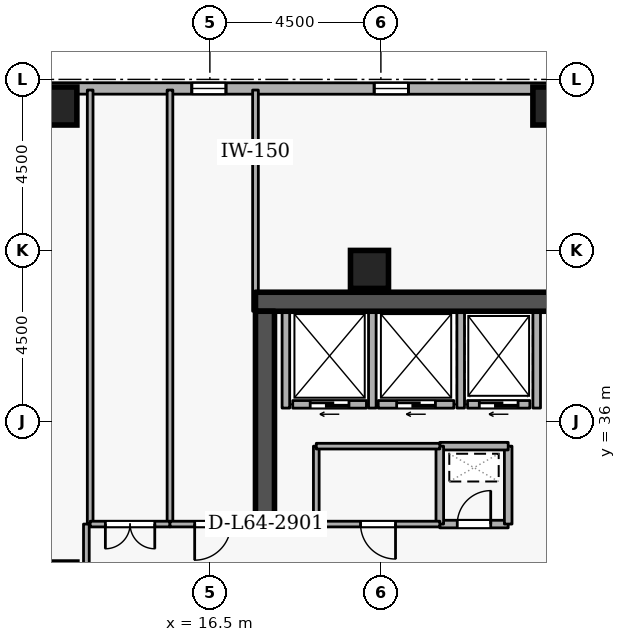
"""IFC4 building model, lengths in metres.
Left out: names, types, materials, properties, quantities, classifications, styles, units other than length and angle.
Written with IfcOpenShell. Run it as: python <this file> out.ifc"""

import sys

from ifc_helpers import new_model, si_unit, direction, frame, frame_2d, origin, origin_2d, place, context, subcontext, project, spatial, rectangle, extrude, element, fill, save


model = new_model("IFC4")
c1 = context("Model", 3, precision=1e-05, world=origin(), true_north=direction((0.0, 1.0)))
c2 = subcontext(c1, "Body", "Model", "MODEL_VIEW")
j1 = project(units=[si_unit("LENGTHUNIT", "METRE"), si_unit("PLANEANGLEUNIT", "RADIAN")], contexts=[c1])
p1 = place(None, origin())
s1 = spatial("IfcSite", under=j1, at=p1, CompositionType="ELEMENT")
p2 = place(p1, origin())
s2 = spatial("IfcBuilding", under=s1, at=p2, CompositionType="ELEMENT")
p3 = place(p2, frame((0.0, 0.0, 240.3)))
s3 = spatial("IfcBuildingStorey", under=s2, at=p3, CompositionType="ELEMENT", Elevation=240.3)
p4 = place(p3, frame((17.7, 39.15, 0.0), z_axis=(0.0, 0.0, 1.0), x_axis=(1.0, 0.0, 0.0)))
e1 = element("IfcWall", 1, at=p4, inside=s3, PredefinedType="SHEAR", context=c2, shape_type="SweptSolid", body=[
    extrude(rectangle(XDim=15.6, YDim=0.5, at=frame_2d((7.8, 0.0))), origin(), (0.0, 0.0, 1.0), 3.6),
])
p5 = place(p3, frame((17.95, 33.1, 0.0), z_axis=(0.0, 0.0, 1.0), x_axis=(0.0, 1.0, 0.0)))
e2 = element("IfcWall", 2, at=p5, inside=s3, PredefinedType="SHEAR", context=c2, shape_type="SweptSolid", body=[
    extrude(rectangle(XDim=5.8, YDim=0.5, at=frame_2d((2.9, 0.0))), origin(), (0.0, 0.0, 1.0), 3.6),
])
for number, where, z_axis, x_axis in (
    (3, (12.5, 44.3, 0.0), (0.0, 0.0, 1.0), (1.0, 0.0, 0.0)),
    (4, (25.5, 44.3, 0.0), (0.0, 0.0, 1.0), (1.0, 0.0, 0.0)),
    (5, (20.7, 40.0, 0.0), (0.0, 0.0, 1.0), (1.0, 0.0, 0.0)),
):
    element("IfcColumn", number, at=place(p3, frame(where, z_axis=z_axis, x_axis=x_axis)), inside=s3, PredefinedType="COLUMN", context=c2, shape_type="SweptSolid", body=[
        extrude(rectangle(XDim=1.0, YDim=1.0, at=origin_2d()), origin(), (0.0, 0.0, 1.0), 3.6),
    ])
p6 = place(p3, frame((37.924, 44.756, 0.0), z_axis=(0.0, 0.0, 1.0), x_axis=(-0.999999963872, 0.000268805477, 0.0)))
e6 = element("IfcWall", 6, at=p6, inside=s3, PredefinedType="STANDARD", context=c2, shape_type="SweptSolid", body=[
    extrude(rectangle(XDim=33.605, YDim=0.3, at=frame_2d((16.802, 0.0))), origin(), (0.0, 0.0, 1.0), 2.7),
])
p7 = place(p6, frame((6.6, 0.0, 0.72)))
e7 = element("IfcOpeningElement", 7, at=p7, cuts=e6, PredefinedType="OPENING", context=c2, shape_type="SweptSolid", body=[
    extrude(rectangle(XDim=0.9, YDim=1.75, at=frame_2d((0.45, 0.875))), frame((0.0, 0.16, 0.0), z_axis=(0.0, -1.0, 0.0), x_axis=(1.0, 0.0, 0.0)), (0.0, 0.0, 1.0), 0.32),
])
p8 = place(p6, frame((16.2, 0.0, 0.72)))
e8 = element("IfcOpeningElement", 8, at=p8, cuts=e6, PredefinedType="OPENING", context=c2, shape_type="SweptSolid", body=[
    extrude(rectangle(XDim=0.9, YDim=1.75, at=frame_2d((0.45, 0.875))), frame((0.0, 0.16, 0.0), z_axis=(0.0, -1.0, 0.0), x_axis=(1.0, 0.0, 0.0)), (0.0, 0.0, 1.0), 0.32),
])
p9 = place(p6, frame((21.0, 0.0, 0.72)))
e9 = element("IfcOpeningElement", 9, at=p9, cuts=e6, PredefinedType="OPENING", context=c2, shape_type="SweptSolid", body=[
    extrude(rectangle(XDim=0.9, YDim=1.75, at=frame_2d((0.45, 0.875))), frame((0.0, 0.16, 0.0), z_axis=(0.0, -1.0, 0.0), x_axis=(1.0, 0.0, 0.0)), (0.0, 0.0, 1.0), 0.32),
])
p10 = place(p6, frame((30.6, 0.0, 0.72)))
e10 = element("IfcOpeningElement", 10, at=p10, cuts=e6, PredefinedType="OPENING", context=c2, shape_type="SweptSolid", body=[
    extrude(rectangle(XDim=0.9, YDim=1.75, at=frame_2d((0.45, 0.875))), frame((0.0, 0.16, 0.0), z_axis=(0.0, -1.0, 0.0), x_axis=(1.0, 0.0, 0.0)), (0.0, 0.0, 1.0), 0.32),
])
p11 = place(p3, frame((24.92, 36.45, 0.0), z_axis=(0.0, 0.0, 1.0), x_axis=(-1.0, 0.0, 0.0)))
e11 = element("IfcWall", 11, at=p11, inside=s3, PredefinedType="STANDARD", context=c2, shape_type="SweptSolid", body=[
    extrude(rectangle(XDim=1.64, YDim=0.2, at=frame_2d((0.82, 0.0))), origin(), (0.0, 0.0, 1.0), 3.34),
])
p12 = place(p11, frame((0.31, 0.0, 0.0)))
e12 = element("IfcOpeningElement", 12, at=p12, cuts=e11, PredefinedType="OPENING", context=c2, shape_type="SweptSolid", body=[
    extrude(rectangle(XDim=1.02, YDim=2.06, at=frame_2d((0.51, 1.03))), frame((0.0, 0.11, 0.0), z_axis=(0.0, -1.0, 0.0), x_axis=(1.0, 0.0, 0.0)), (0.0, 0.0, 1.0), 0.22),
])
p13 = place(p3, frame((22.92, 36.45, 0.0), z_axis=(0.0, 0.0, 1.0), x_axis=(-1.0, 0.0, 0.0)))
e13 = element("IfcWall", 13, at=p13, inside=s3, PredefinedType="STANDARD", context=c2, shape_type="SweptSolid", body=[
    extrude(rectangle(XDim=1.99, YDim=0.2, at=frame_2d((0.995, 0.0))), origin(), (0.0, 0.0, 1.0), 3.34),
])
p14 = place(p13, frame((0.485, 0.0, 0.0)))
e14 = element("IfcOpeningElement", 14, at=p14, cuts=e13, PredefinedType="OPENING", context=c2, shape_type="SweptSolid", body=[
    extrude(rectangle(XDim=1.02, YDim=2.06, at=frame_2d((0.51, 1.03))), frame((0.0, 0.11, 0.0), z_axis=(0.0, -1.0, 0.0), x_axis=(1.0, 0.0, 0.0)), (0.0, 0.0, 1.0), 0.22),
])
p15 = place(p3, frame((20.62, 36.45, 0.0), z_axis=(0.0, 0.0, 1.0), x_axis=(-1.0, 0.0, 0.0)))
e15 = element("IfcWall", 15, at=p15, inside=s3, PredefinedType="STANDARD", context=c2, shape_type="SweptSolid", body=[
    extrude(rectangle(XDim=1.94, YDim=0.2, at=frame_2d((0.97, 0.0))), origin(), (0.0, 0.0, 1.0), 3.34),
])
p16 = place(p15, frame((0.46, 0.0, 0.0)))
e16 = element("IfcOpeningElement", 16, at=p16, cuts=e15, PredefinedType="OPENING", context=c2, shape_type="SweptSolid", body=[
    extrude(rectangle(XDim=1.02, YDim=2.06, at=frame_2d((0.51, 1.03))), frame((0.0, 0.11, 0.0), z_axis=(0.0, -1.0, 0.0), x_axis=(1.0, 0.0, 0.0)), (0.0, 0.0, 1.0), 0.22),
])
for number, where, z_axis, x_axis in (
    (17, (25.1, 36.352, 0.0), (0.0, 0.0, 1.0), (0.0, 1.0, 0.0)),
    (18, (23.1, 36.352, 0.0), (0.0, 0.0, 1.0), (0.0, 1.0, 0.0)),
    (19, (20.775, 36.352, 0.0), (0.0, 0.0, 1.0), (0.0, 1.0, 0.0)),
    (20, (18.5, 36.352, 0.0), (0.0, 0.0, 1.0), (0.0, 1.0, 0.0)),
):
    element("IfcWall", number, at=place(p3, frame(where, z_axis=z_axis, x_axis=x_axis)), inside=s3, PredefinedType="STANDARD", context=c2, shape_type="SweptSolid", body=[
        extrude(rectangle(XDim=2.536, YDim=0.2, at=frame_2d((1.268, 0.0))), origin(), (0.0, 0.0, 1.0), 3.34),
    ])
p17 = place(p3, frame((22.55, 33.3, 0.0), z_axis=(0.0, 0.0, 1.0), x_axis=(1.0, 0.0, 0.0)))
e21 = element("IfcWall", 21, at=p17, inside=s3, PredefinedType="STANDARD", context=c2, shape_type="SweptSolid", body=[
    extrude(rectangle(XDim=1.8, YDim=0.2, at=frame_2d((0.9, 0.0))), origin(), (0.0, 0.0, 1.0), 3.34),
])
p18 = place(p17, frame((0.46, 0.0, 0.0)))
e22 = element("IfcOpeningElement", 22, at=p18, cuts=e21, PredefinedType="OPENING", context=c2, shape_type="SweptSolid", body=[
    extrude(rectangle(XDim=0.88, YDim=2.04, at=frame_2d((0.44, 1.02))), frame((0.0, 0.11, 0.0), z_axis=(0.0, -1.0, 0.0), x_axis=(1.0, 0.0, 0.0)), (0.0, 0.0, 1.0), 0.22),
])
p19 = place(p3, frame((24.35, 33.3, 0.0), z_axis=(0.0, 0.0, 1.0), x_axis=(0.0, 1.0, 0.0)))
e23 = element("IfcWall", 23, at=p19, inside=s3, PredefinedType="STANDARD", context=c2, shape_type="SweptSolid", body=[
    extrude(rectangle(XDim=2.05, YDim=0.2, at=frame_2d((1.025, 0.0))), origin(), (0.0, 0.0, 1.0), 3.34),
])
p20 = place(p3, frame((24.35, 35.35, 0.0), z_axis=(0.0, 0.0, 1.0), x_axis=(-1.0, 0.0, 0.0)))
e24 = element("IfcWall", 24, at=p20, inside=s3, PredefinedType="STANDARD", context=c2, shape_type="SweptSolid", body=[
    extrude(rectangle(XDim=1.8, YDim=0.2, at=frame_2d((0.9, 0.0))), origin(), (0.0, 0.0, 1.0), 3.34),
])
p21 = place(p3, frame((22.55, 35.35, 0.0), z_axis=(0.0, 0.0, 1.0), x_axis=(0.0, -1.0, 0.0)))
e25 = element("IfcWall", 25, at=p21, inside=s3, PredefinedType="STANDARD", context=c2, shape_type="SweptSolid", body=[
    extrude(rectangle(XDim=2.05, YDim=0.2, at=frame_2d((1.025, 0.0))), origin(), (0.0, 0.0, 1.0), 3.34),
])
p22 = place(p3, frame((19.3, 33.3, 0.0), z_axis=(0.0, 0.0, 1.0), x_axis=(0.0, 1.0, 0.0)))
e26 = element("IfcWall", 26, at=p22, inside=s3, PredefinedType="PARTITIONING", context=c2, shape_type="SweptSolid", body=[
    extrude(rectangle(XDim=2.05, YDim=0.15, at=frame_2d((1.025, 0.0))), origin(), (0.0, 0.0, 1.0), 3.34),
])
p23 = place(p3, frame((19.3, 35.35, 0.0), z_axis=(0.0, 0.0, 1.0), x_axis=(1.0, 0.0, 0.0)))
e27 = element("IfcWall", 27, at=p23, inside=s3, PredefinedType="PARTITIONING", context=c2, shape_type="SweptSolid", body=[
    extrude(rectangle(XDim=3.25, YDim=0.15, at=frame_2d((1.625, 0.0))), origin(), (0.0, 0.0, 1.0), 3.34),
])
p24 = place(p3, frame((22.55, 33.3, 0.0), z_axis=(0.0, 0.0, 1.0), x_axis=(-1.0, 0.0, 0.0)))
e28 = element("IfcWall", 28, at=p24, inside=s3, PredefinedType="PARTITIONING", context=c2, shape_type="SweptSolid", body=[
    extrude(rectangle(XDim=3.25, YDim=0.15, at=frame_2d((1.625, 0.0))), origin(), (0.0, 0.0, 1.0), 3.34),
])
p25 = place(p24, frame((1.165, 0.0, 0.0)))
e29 = element("IfcOpeningElement", 29, at=p25, cuts=e28, PredefinedType="OPENING", context=c2, shape_type="SweptSolid", body=[
    extrude(rectangle(XDim=0.92, YDim=2.08, at=frame_2d((0.46, 1.04))), frame((0.0, 0.085, 0.0), z_axis=(0.0, -1.0, 0.0), x_axis=(1.0, 0.0, 0.0)), (0.0, 0.0, 1.0), 0.17),
])
for number, where, z_axis, x_axis in (
    (30, (13.35, 33.3, 0.0), (0.0, 0.0, 1.0), (0.0, 1.0, 0.0)),
    (31, (15.45, 44.72, 0.0), (0.0, 0.0, 1.0), (0.0, -1.0, 0.0)),
):
    element("IfcWall", number, at=place(p3, frame(where, z_axis=z_axis, x_axis=x_axis)), inside=s3, PredefinedType="PARTITIONING", context=c2, shape_type="SweptSolid", body=[
        extrude(rectangle(XDim=11.42, YDim=0.15, at=frame_2d((5.71, 0.0))), origin(), (0.0, 0.0, 1.0), 3.34),
    ])
p26 = place(p3, frame((15.45, 33.3, 0.0), z_axis=(0.0, 0.0, 1.0), x_axis=(-1.0, 0.0, 0.0)))
e32 = element("IfcWall", 32, at=p26, inside=s3, PredefinedType="PARTITIONING", context=c2, shape_type="SweptSolid", body=[
    extrude(rectangle(XDim=2.1, YDim=0.15, at=frame_2d((1.05, 0.0))), origin(), (0.0, 0.0, 1.0), 3.34),
])
p27 = place(p26, frame((0.4, 0.0, 0.0)))
e33 = element("IfcOpeningElement", 33, at=p27, cuts=e32, PredefinedType="OPENING", context=c2, shape_type="SweptSolid", body=[
    extrude(rectangle(XDim=1.3, YDim=2.12, at=frame_2d((0.65, 1.06))), frame((0.0, 0.085, 0.0), z_axis=(0.0, -1.0, 0.0), x_axis=(1.0, 0.0, 0.0)), (0.0, 0.0, 1.0), 0.17),
])
p28 = place(p3, frame((17.7, 44.72, 0.0), z_axis=(0.0, 0.0, 1.0), x_axis=(0.0, -1.0, 0.0)))
e34 = element("IfcWall", 34, at=p28, inside=s3, PredefinedType="PARTITIONING", context=c2, shape_type="SweptSolid", body=[
    extrude(rectangle(XDim=5.82, YDim=0.15, at=frame_2d((2.91, 0.0))), origin(), (0.0, 0.0, 1.0), 2.545),
])
p29 = place(p3, frame((17.7, 33.3, 0.0), z_axis=(0.0, 0.0, 1.0), x_axis=(-1.0, 0.0, 0.0)))
e35 = element("IfcWall", 35, at=p29, inside=s3, PredefinedType="PARTITIONING", context=c2, shape_type="SweptSolid", body=[
    extrude(rectangle(XDim=2.25, YDim=0.15, at=frame_2d((1.125, 0.0))), origin(), (0.0, 0.0, 1.0), 3.34),
])
p30 = place(p29, frame((0.65, 0.0, 0.0)))
e36 = element("IfcOpeningElement", 36, at=p30, cuts=e35, PredefinedType="OPENING", context=c2, shape_type="SweptSolid", body=[
    extrude(rectangle(XDim=0.95, YDim=2.1, at=frame_2d((0.475, 1.05))), frame((0.0, 0.085, 0.0), z_axis=(0.0, -1.0, 0.0), x_axis=(1.0, 0.0, 0.0)), (0.0, 0.0, 1.0), 0.17),
])
p31 = place(p3, frame((13.25, 33.3, 0.0), z_axis=(0.0, 0.0, 1.0), x_axis=(0.0, -1.0, 0.0)))
e37 = element("IfcWall", 37, at=p31, inside=s3, PredefinedType="PARTITIONING", context=c2, shape_type="SweptSolid", body=[
    extrude(rectangle(XDim=1.75, YDim=0.15, at=frame_2d((0.875, 0.0))), origin(), (0.0, 0.0, 1.0), 3.34),
])
p32 = place(p8, origin())
e38 = element("IfcWindow", 38, at=p32, inside=s3, PartitioningType="SINGLE_PANEL", PredefinedType="WINDOW", context=c2, shape_type="SweptSolid", body=[
    extrude(rectangle(XDim=0.9, YDim=1.75, at=frame_2d((0.45, 0.875))), frame((0.0, 0.03, 0.0), z_axis=(0.0, -1.0, 0.0), x_axis=(1.0, 0.0, 0.0)), (0.0, 0.0, 1.0), 0.06),
])
fill(e8, e38)
p33 = place(p9, origin())
e39 = element("IfcWindow", 39, at=p33, inside=s3, PartitioningType="SINGLE_PANEL", PredefinedType="WINDOW", context=c2, shape_type="SweptSolid", body=[
    extrude(rectangle(XDim=0.9, YDim=1.75, at=frame_2d((0.45, 0.875))), frame((0.0, 0.03, 0.0), z_axis=(0.0, -1.0, 0.0), x_axis=(1.0, 0.0, 0.0)), (0.0, 0.0, 1.0), 0.06),
])
fill(e9, e39)
p34 = place(p12, origin())
e40 = element("IfcDoor", 40, at=p34, inside=s3, OperationType="SLIDING_TO_LEFT", PredefinedType="DOOR", context=c2, shape_type="SweptSolid", body=[
    extrude(rectangle(XDim=1.02, YDim=2.06, at=frame_2d((0.51, 1.03))), frame((0.0, 0.025, 0.0), z_axis=(0.0, -1.0, 0.0), x_axis=(1.0, 0.0, 0.0)), (0.0, 0.0, 1.0), 0.05),
])
fill(e12, e40)
p35 = place(p14, origin())
e41 = element("IfcDoor", 41, at=p35, inside=s3, OperationType="SLIDING_TO_LEFT", PredefinedType="DOOR", context=c2, shape_type="SweptSolid", body=[
    extrude(rectangle(XDim=1.02, YDim=2.06, at=frame_2d((0.51, 1.03))), frame((0.0, 0.025, 0.0), z_axis=(0.0, -1.0, 0.0), x_axis=(1.0, 0.0, 0.0)), (0.0, 0.0, 1.0), 0.05),
])
fill(e14, e41)
p36 = place(p16, origin())
e42 = element("IfcDoor", 42, at=p36, inside=s3, OperationType="SLIDING_TO_LEFT", PredefinedType="DOOR", context=c2, shape_type="SweptSolid", body=[
    extrude(rectangle(XDim=1.02, YDim=2.06, at=frame_2d((0.51, 1.03))), frame((0.0, 0.025, 0.0), z_axis=(0.0, -1.0, 0.0), x_axis=(1.0, 0.0, 0.0)), (0.0, 0.0, 1.0), 0.05),
])
fill(e16, e42)
p37 = place(p18, origin())
e43 = element("IfcDoor", 43, at=p37, inside=s3, OperationType="SINGLE_SWING_RIGHT", PredefinedType="DOOR", context=c2, shape_type="SweptSolid", body=[
    extrude(rectangle(XDim=0.88, YDim=2.04, at=frame_2d((0.44, 1.02))), frame((0.0, 0.025, 0.0), z_axis=(0.0, -1.0, 0.0), x_axis=(1.0, 0.0, 0.0)), (0.0, 0.0, 1.0), 0.05),
])
fill(e22, e43)
p38 = place(p25, origin())
e44 = element("IfcDoor", 44, at=p38, inside=s3, OperationType="SINGLE_SWING_LEFT", PredefinedType="DOOR", context=c2, shape_type="SweptSolid", body=[
    extrude(rectangle(XDim=0.92, YDim=2.08, at=frame_2d((0.46, 1.04))), frame((0.0, 0.025, 0.0), z_axis=(0.0, -1.0, 0.0), x_axis=(1.0, 0.0, 0.0)), (0.0, 0.0, 1.0), 0.05),
])
fill(e29, e44)
p39 = place(p27, origin())
e45 = element("IfcDoor", 45, at=p39, inside=s3, OperationType="DOUBLE_DOOR_SINGLE_SWING", PredefinedType="DOOR", context=c2, shape_type="SweptSolid", body=[
    extrude(rectangle(XDim=1.3, YDim=2.12, at=frame_2d((0.65, 1.06))), frame((0.0, 0.025, 0.0), z_axis=(0.0, -1.0, 0.0), x_axis=(1.0, 0.0, 0.0)), (0.0, 0.0, 1.0), 0.05),
])
fill(e33, e45)
p40 = place(p30, origin())
e46 = element("IfcDoor", 46, at=p40, inside=s3, OperationType="SINGLE_SWING_RIGHT", PredefinedType="DOOR", context=c2, shape_type="SweptSolid", body=[
    extrude(rectangle(XDim=0.95, YDim=2.1, at=frame_2d((0.475, 1.05))), frame((0.0, 0.025, 0.0), z_axis=(0.0, -1.0, 0.0), x_axis=(1.0, 0.0, 0.0)), (0.0, 0.0, 1.0), 0.05),
])
fill(e36, e46)
save(model, sys.argv[1])
